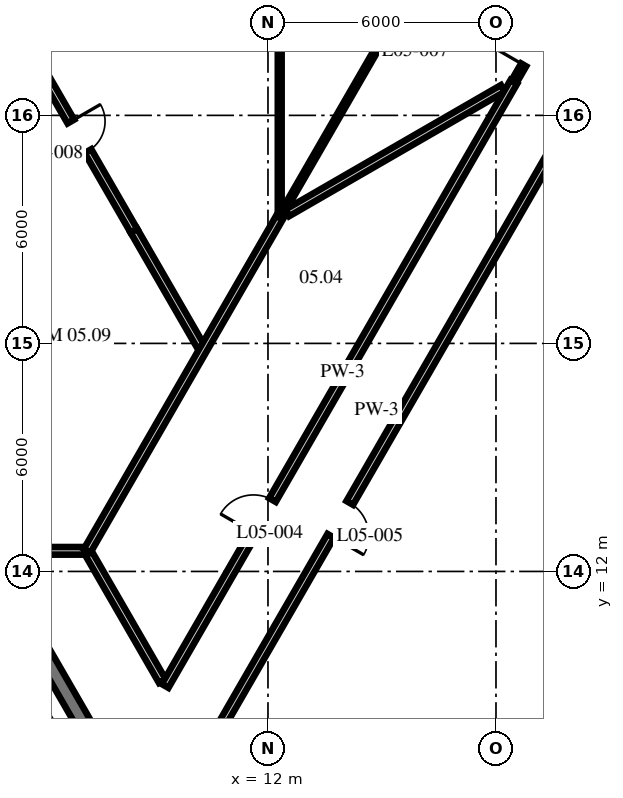
"""IFC4 building model, lengths in metres.
Left out: names, types, materials, properties, quantities, classifications, styles, units other than length and angle.
Written with IfcOpenShell. Run it as: python <this file> out.ifc"""

import sys

from ifc_helpers import new_model, si_unit, direction, frame, frame_2d, origin, place, context, subcontext, project, spatial, polyline, rectangle, outline, extrude, source, transform, mapped, element, fill, save


model = new_model("IFC4")
c1 = context("Model", 3, precision=1e-05, world=origin(), true_north=direction((0.0, 1.0)))
c2 = subcontext(c1, "Body", "Model", "MODEL_VIEW")
j1 = project(units=[si_unit("LENGTHUNIT", "METRE"), si_unit("PLANEANGLEUNIT", "RADIAN")], contexts=[c1])
p1 = place(None, origin())
s1 = spatial("IfcSite", under=j1, at=p1, CompositionType="ELEMENT")
p2 = place(p1, origin())
s2 = spatial("IfcBuilding", under=s1, at=p2, CompositionType="ELEMENT")
p3 = place(p2, frame((0.0, 0.0, 24.6)))
s3 = spatial("IfcBuildingStorey", under=s2, at=p3, CompositionType="ELEMENT", Elevation=24.6)
m1 = source(origin(), c2, "Body", "SweptSolid", [
    extrude(outline(polyline([(-0.115, -0.2), (11.885, -0.2), (11.654, 0.2), (0.115, 0.2), (-0.115, -0.2)])), origin(), (0.0, 0.0, 1.0), 4.1),
])
p4 = place(p3, frame((11.769, 0.0, 0.0), z_axis=(0.0, 0.0, 1.0), x_axis=(-0.499996592174, 0.866027371285, 0.0)))
e1 = element("IfcWall", 1, at=p4, inside=s3, PredefinedType="SHEAR", context=c2, shape_type="MappedRepresentation", body=[
    mapped(m1, transform((0.0, 0.0, 0.0), scale=1.0)),
])
p5 = place(p4, frame((5.75, 0.0, 0.0)))
e2 = element("IfcOpeningElement", 2, at=p5, cuts=e1, PredefinedType="OPENING", context=c2, shape_type="SweptSolid", body=[
    extrude(rectangle(XDim=1.2, YDim=2.1, at=frame_2d((0.6, 1.05))), frame((0.0, 0.21, 0.0), z_axis=(0.0, -1.0, 0.0), x_axis=(1.0, 0.0, 0.0)), (0.0, 0.0, 1.0), 0.42),
])
m2 = source(origin(), c2, "Body", "SweptSolid", [
    extrude(rectangle(XDim=3.885, YDim=0.2, at=frame_2d((1.942, 0.0))), origin(), (0.0, 0.0, 1.0), 4.1),
])
p6 = place(p3, frame((7.276, 12.482, 0.0), z_axis=(0.0, 0.0, 1.0), x_axis=(0.499978127697, -0.866038031396, 0.0)))
e3 = element("IfcWall", 3, at=p6, inside=s3, PredefinedType="PARTITIONING", context=c2, shape_type="MappedRepresentation", body=[
    mapped(m2, transform((0.0, 0.0, 0.0), scale=1.0)),
])
m3 = source(origin(), c2, "Body", "SweptSolid", [
    extrude(rectangle(XDim=7.568, YDim=0.2, at=frame_2d((3.784, 0.0))), origin(), (0.0, 0.0, 1.0), 3.488),
])
p7 = place(p3, frame((4.689, 27.518, 0.0), z_axis=(0.0, 0.0, 1.0), x_axis=(0.499997032024, -0.866027117339, 0.0)))
e4 = element("IfcWall", 4, at=p7, inside=s3, PredefinedType="PARTITIONING", context=c2, shape_type="MappedRepresentation", body=[
    mapped(m3, transform((0.0, 0.0, 0.0), scale=1.0)),
])
p8 = place(p7, frame((4.248, 0.0, 0.0)))
e5 = element("IfcOpeningElement", 5, at=p8, cuts=e4, PredefinedType="OPENING", context=c2, shape_type="SweptSolid", body=[
    extrude(rectangle(XDim=0.9, YDim=2.1, at=frame_2d((0.45, 1.05))), frame((0.0, 0.11, 0.0), z_axis=(0.0, -1.0, 0.0), x_axis=(1.0, 0.0, 0.0)), (0.0, 0.0, 1.0), 0.22),
])
m4 = source(origin(), c2, "Body", "SweptSolid", [
    extrude(rectangle(XDim=3.629, YDim=0.2, at=frame_2d((1.815, 0.0))), origin(), (0.0, 0.0, 1.0), 4.1),
])
p9 = place(p3, frame((8.474, 20.963, 0.0), z_axis=(0.0, 0.0, 1.0), x_axis=(0.500009718699, -0.866019792618, 0.0)))
e6 = element("IfcWall", 6, at=p9, inside=s3, PredefinedType="PARTITIONING", context=c2, shape_type="MappedRepresentation", body=[
    mapped(m4, transform((0.0, 0.0, 0.0), scale=1.0)),
])
m5 = source(origin(), c2, "Body", "SweptSolid", [
    extrude(rectangle(XDim=4.058, YDim=0.2, at=frame_2d((2.029, 0.0))), origin(), (0.0, 0.0, 1.0), 4.1),
])
p10 = place(p3, frame((3.114, 12.542, 0.0), z_axis=(0.0, 0.0, 1.0), x_axis=(1.0, 0.0, 0.0)))
e7 = element("IfcWall", 7, at=p10, inside=s3, PredefinedType="PARTITIONING", context=c2, shape_type="MappedRepresentation", body=[
    mapped(m5, transform((0.0, 0.0, 0.0), scale=1.0)),
])
p11 = place(p10, frame((1.578, 0.0, 0.0)))
e8 = element("IfcOpeningElement", 8, at=p11, cuts=e7, PredefinedType="OPENING", context=c2, shape_type="SweptSolid", body=[
    extrude(rectangle(XDim=1.0, YDim=2.1, at=frame_2d((0.5, 1.05))), frame((0.0, 0.11, 0.0), z_axis=(0.0, -1.0, 0.0), x_axis=(1.0, 0.0, 0.0)), (0.0, 0.0, 1.0), 0.22),
])
m6 = source(origin(), c2, "Body", "SweptSolid", [
    extrude(rectangle(XDim=6.55, YDim=0.2, at=frame_2d((3.275, 0.0))), origin(), (0.0, 0.0, 1.0), 4.1),
])
p12 = place(p3, frame((12.508, 21.435, 0.0), z_axis=(0.0, 0.0, 1.0), x_axis=(0.866021102686, 0.500007449647, 0.0)))
e9 = element("IfcWall", 9, at=p12, inside=s3, PredefinedType="PARTITIONING", context=c2, shape_type="MappedRepresentation", body=[
    mapped(m6, transform((0.0, 0.0, 0.0), scale=1.0)),
])
m7 = source(origin(), c2, "Body", "SweptSolid", [
    extrude(rectangle(XDim=20.193, YDim=0.2, at=frame_2d((10.096, 0.0))), origin(), (0.0, 0.0, 1.0), 4.1),
])
p13 = place(p3, frame((10.333, 7.187, 0.0), z_axis=(0.0, 0.0, 1.0), x_axis=(0.499999796593, 0.866025521222, 0.0)))
e10 = element("IfcWall", 10, at=p13, inside=s3, PredefinedType="PARTITIONING", context=c2, shape_type="MappedRepresentation", body=[
    mapped(m7, transform((0.0, 0.0, 0.0), scale=1.0)),
])
p14 = place(p13, frame((6.639, 0.0, 0.0)))
e11 = element("IfcOpeningElement", 11, at=p14, cuts=e10, PredefinedType="OPENING", context=c2, shape_type="SweptSolid", body=[
    extrude(rectangle(XDim=1.0, YDim=2.1, at=frame_2d((0.5, 1.05))), frame((0.0, 0.11, 0.0), z_axis=(0.0, -1.0, 0.0), x_axis=(1.0, 0.0, 0.0)), (0.0, 0.0, 1.0), 0.22),
])
m8 = source(origin(), c2, "Body", "SweptSolid", [
    extrude(rectangle(XDim=18.352, YDim=0.2, at=frame_2d((9.176, 0.0))), origin(), (0.0, 0.0, 1.0), 4.1),
])
p15 = place(p3, frame((9.294, 8.987, 0.0), z_axis=(0.0, 0.0, 1.0), x_axis=(0.500002290144, 0.866024081565, 0.0)))
e12 = element("IfcWall", 12, at=p15, inside=s3, PredefinedType="PARTITIONING", context=c2, shape_type="MappedRepresentation", body=[
    mapped(m8, transform((0.0, 0.0, 0.0), scale=1.0)),
])
p16 = place(p15, frame((4.649, 0.0, 0.0)))
e13 = element("IfcOpeningElement", 13, at=p16, cuts=e12, PredefinedType="OPENING", context=c2, shape_type="SweptSolid", body=[
    extrude(rectangle(XDim=1.0, YDim=2.1, at=frame_2d((0.5, 1.05))), frame((0.0, 0.11, 0.0), z_axis=(0.0, -1.0, 0.0), x_axis=(1.0, 0.0, 0.0)), (0.0, 0.0, 1.0), 0.22),
])
m9 = source(origin(), c2, "Body", "SweptSolid", [
    extrude(rectangle(XDim=1.955, YDim=0.15, at=frame_2d((0.978, 0.0))), origin(), (0.0, 0.0, 1.0), 4.1),
])
p17 = place(p3, frame((18.47, 24.88, 0.0), z_axis=(0.0, 0.0, 1.0), x_axis=(0.500061185694, 0.865990075325, 0.0)))
e14 = element("IfcWall", 14, at=p17, inside=s3, PredefinedType="PARTITIONING", context=c2, shape_type="MappedRepresentation", body=[
    mapped(m9, transform((0.0, 0.0, 0.0), scale=1.0)),
])
p18 = place(p17, frame((0.517, 0.0, 0.0)))
e15 = element("IfcOpeningElement", 15, at=p18, cuts=e14, PredefinedType="OPENING", context=c2, shape_type="SweptSolid", body=[
    extrude(rectangle(XDim=0.9, YDim=2.1, at=frame_2d((0.45, 1.05))), frame((0.0, 0.085, 0.0), z_axis=(0.0, -1.0, 0.0), x_axis=(1.0, 0.0, 0.0)), (0.0, 0.0, 1.0), 0.17),
])
m10 = source(origin(), c2, "Body", "SweptSolid", [
    extrude(rectangle(XDim=10.136, YDim=0.2, at=frame_2d((5.068, 0.0))), origin(), (0.0, 0.0, 1.0), 4.1),
])
p19 = place(p3, frame((7.241, 12.542, 0.0), z_axis=(0.0, 0.0, 1.0), x_axis=(0.49999906822, 0.866025941747, 0.0)))
e16 = element("IfcWall", 16, at=p19, inside=s3, PredefinedType="PARTITIONING", context=c2, shape_type="MappedRepresentation", body=[
    mapped(m10, transform((0.0, 0.0, 0.0), scale=1.0)),
])
m11 = source(origin(), c2, "Body", "SweptSolid", [
    extrude(rectangle(XDim=9.027, YDim=0.1, at=frame_2d((4.514, 0.0))), origin(), (0.0, 0.0, 1.0), 4.1),
])
p20 = place(p3, frame((12.384, 21.45, 0.0), z_axis=(0.0, 0.0, 1.0), x_axis=(0.500013529965, 0.866017592115, 0.0)))
e17 = element("IfcWall", 17, at=p20, inside=s3, PredefinedType="PARTITIONING", context=c2, shape_type="MappedRepresentation", body=[
    mapped(m11, transform((0.0, 0.0, 0.0), scale=1.0)),
])
p21 = place(p20, frame((4.962, 0.0, 0.0)))
e18 = element("IfcOpeningElement", 18, at=p21, cuts=e17, PredefinedType="OPENING", context=c2, shape_type="SweptSolid", body=[
    extrude(rectangle(XDim=0.9, YDim=2.1, at=frame_2d((0.45, 1.05))), frame((0.0, 0.06, 0.0), z_axis=(0.0, -1.0, 0.0), x_axis=(1.0, 0.0, 0.0)), (0.0, 0.0, 1.0), 0.12),
])
m12 = source(origin(), c2, "Body", "SweptSolid", [
    extrude(rectangle(XDim=9.446, YDim=0.1, at=frame_2d((4.723, 0.0))), origin(), (0.0, 0.0, 1.0), 4.1),
])
p22 = place(p3, frame((12.309, 21.32, 0.0), z_axis=(0.0, 0.0, 1.0), x_axis=(0.0, 1.0, 0.0)))
e19 = element("IfcWall", 19, at=p22, inside=s3, PredefinedType="PARTITIONING", context=c2, shape_type="MappedRepresentation", body=[
    mapped(m12, transform((0.0, 0.0, 0.0), scale=1.0)),
])
p23 = place(p16, origin())
e20 = element("IfcDoor", 20, at=p23, inside=s3, OperationType="SINGLE_SWING_LEFT", PredefinedType="DOOR", context=c2, shape_type="SweptSolid", body=[
    extrude(rectangle(XDim=1.0, YDim=2.1, at=frame_2d((0.5, 1.05))), frame((0.0, 0.025, 0.0), z_axis=(0.0, -1.0, 0.0), x_axis=(1.0, 0.0, 0.0)), (0.0, 0.0, 1.0), 0.05),
])
fill(e13, e20)
p24 = place(p14, origin())
e21 = element("IfcDoor", 21, at=p24, inside=s3, OperationType="SINGLE_SWING_RIGHT", PredefinedType="DOOR", context=c2, shape_type="SweptSolid", body=[
    extrude(rectangle(XDim=1.0, YDim=2.1, at=frame_2d((0.5, 1.05))), frame((0.0, 0.025, 0.0), z_axis=(0.0, -1.0, 0.0), x_axis=(1.0, 0.0, 0.0)), (0.0, 0.0, 1.0), 0.05),
])
fill(e11, e21)
p25 = place(p18, origin())
e22 = element("IfcDoor", 22, at=p25, inside=s3, OperationType="SINGLE_SWING_LEFT", PredefinedType="DOOR", context=c2, shape_type="SweptSolid", body=[
    extrude(rectangle(XDim=0.9, YDim=2.1, at=frame_2d((0.45, 1.05))), frame((0.0, 0.025, 0.0), z_axis=(0.0, -1.0, 0.0), x_axis=(1.0, 0.0, 0.0)), (0.0, 0.0, 1.0), 0.05),
])
fill(e15, e22)
p26 = place(p8, origin())
e23 = element("IfcDoor", 23, at=p26, inside=s3, OperationType="SINGLE_SWING_LEFT", PredefinedType="DOOR", context=c2, shape_type="SweptSolid", body=[
    extrude(rectangle(XDim=0.9, YDim=2.1, at=frame_2d((0.45, 1.05))), frame((0.0, 0.025, 0.0), z_axis=(0.0, -1.0, 0.0), x_axis=(1.0, 0.0, 0.0)), (0.0, 0.0, 1.0), 0.05),
])
fill(e5, e23)
save(model, sys.argv[1])
